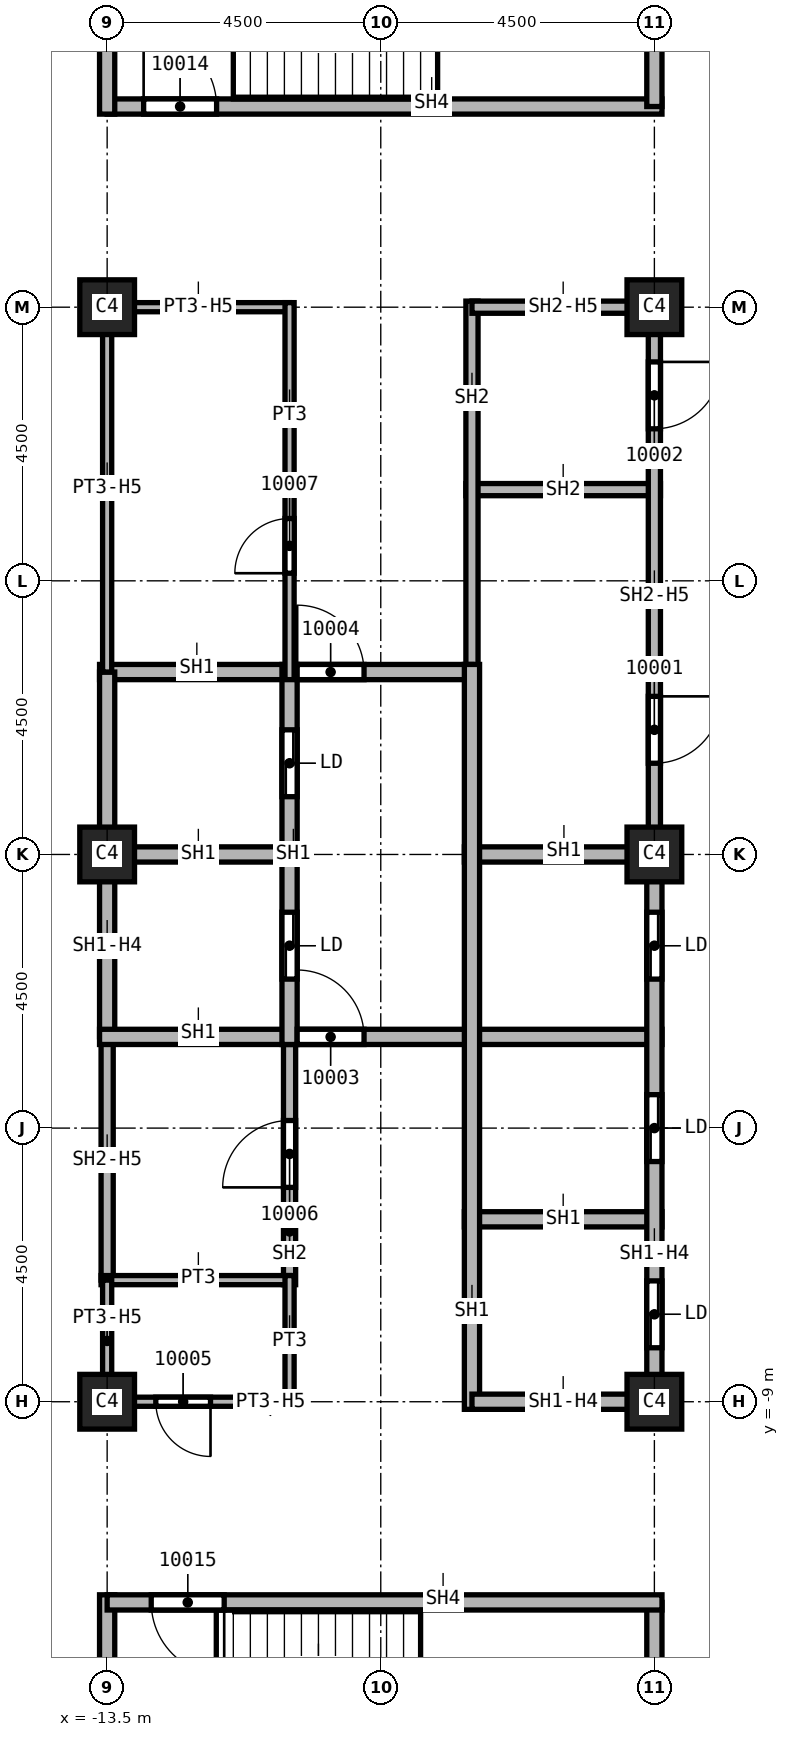
"""IFC4 building model, lengths in metres.
Left out: names, types, materials, properties, quantities, classifications, styles, units other than length and angle.
Written with IfcOpenShell. Run it as: python <this file> out.ifc"""

import sys

from ifc_helpers import new_model, si_unit, direction, frame, frame_2d, origin, origin_2d, place, context, subcontext, project, spatial, rectangle, extrude, element, fill, save


model = new_model("IFC4")
c1 = context("Model", 3, precision=1e-05, world=origin(), true_north=direction((0.0, 1.0)))
c2 = subcontext(c1, "Body", "Model", "MODEL_VIEW")
j1 = project(units=[si_unit("LENGTHUNIT", "METRE"), si_unit("PLANEANGLEUNIT", "RADIAN")], contexts=[c1])
p1 = place(None, origin())
s1 = spatial("IfcSite", under=j1, at=p1, CompositionType="ELEMENT")
p2 = place(p1, origin())
s2 = spatial("IfcBuilding", under=s1, at=p2, CompositionType="ELEMENT")
p3 = place(p2, frame((0.0, 0.0, 170.0)))
s3 = spatial("IfcBuildingStorey", under=s2, at=p3, CompositionType="ELEMENT", Elevation=170.0)
for number, where, z_axis, x_axis in (
    (1, (-4.5, 0.0, 0.0), (0.0, 0.0, 1.0), (1.0, 0.0, 0.0)),
    (2, (-4.5, 9.0, 0.0), (0.0, 0.0, 1.0), (1.0, 0.0, 0.0)),
    (3, (-4.5, -9.0, 0.0), (0.0, 0.0, 1.0), (1.0, 0.0, 0.0)),
    (4, (-13.5, 0.0, 0.0), (0.0, 0.0, 1.0), (1.0, 0.0, 0.0)),
    (5, (-13.5, 9.0, 0.0), (0.0, 0.0, 1.0), (1.0, 0.0, 0.0)),
    (6, (-13.5, -9.0, 0.0), (0.0, 0.0, 1.0), (1.0, 0.0, 0.0)),
):
    element("IfcColumn", number, at=place(p3, frame(where, z_axis=z_axis, x_axis=x_axis)), inside=s3, PredefinedType="COLUMN", context=c2, shape_type="SweptSolid", body=[
        extrude(rectangle(XDim=0.9, YDim=0.9, at=origin_2d()), origin(), (0.0, 0.0, 1.0), 3.7),
    ])
p4 = place(p3, frame((-13.5, -7.0, 0.0), z_axis=(0.0, 0.0, 1.0), x_axis=(0.0, 1.0, 0.0)))
e7 = element("IfcWall", 7, at=p4, inside=s3, PredefinedType="SOLIDWALL", context=c2, shape_type="SweptSolid", body=[
    extrude(rectangle(XDim=4.0, YDim=0.2, at=frame_2d((2.0, 0.0))), origin(), (0.0, 0.0, 1.0), 2.938),
])
p5 = place(p3, frame((-10.5, -7.075, 0.0), z_axis=(0.0, 0.0, 1.0), x_axis=(0.0, 1.0, 0.0)))
e8 = element("IfcWall", 8, at=p5, inside=s3, PredefinedType="SOLIDWALL", context=c2, shape_type="SweptSolid", body=[
    extrude(rectangle(XDim=4.2, YDim=0.2, at=frame_2d((2.1, 0.0))), origin(), (0.0, 0.0, 1.0), 3.7),
])
p6 = place(p5, frame((1.6, 0.0, 0.0)))
e9 = element("IfcOpeningElement", 9, at=p6, cuts=e8, PredefinedType="OPENING", context=c2, shape_type="SweptSolid", body=[
    extrude(rectangle(XDim=1.1, YDim=2.1, at=frame_2d((0.55, 1.05))), frame((0.0, 0.1, 0.0), z_axis=(0.0, -1.0, 0.0), x_axis=(1.0, 0.0, 0.0)), (0.0, 0.0, 1.0), 0.2),
])
p7 = place(p3, frame((-7.6, 6.0, 0.0), z_axis=(0.0, 0.0, 1.0), x_axis=(1.0, 0.0, 0.0)))
e10 = element("IfcWall", 10, at=p7, inside=s3, PredefinedType="SOLIDWALL", context=c2, shape_type="SweptSolid", body=[
    extrude(rectangle(XDim=3.2, YDim=0.2, at=frame_2d((1.6, 0.0))), origin(), (0.0, 0.0, 1.0), 3.7),
])
p8 = place(p3, frame((-7.5, 2.875, 0.0), z_axis=(0.0, 0.0, 1.0), x_axis=(0.0, 1.0, 0.0)))
e11 = element("IfcWall", 11, at=p8, inside=s3, PredefinedType="SOLIDWALL", context=c2, shape_type="SweptSolid", body=[
    extrude(rectangle(XDim=6.225, YDim=0.2, at=frame_2d((3.113, 0.0))), origin(), (0.0, 0.0, 1.0), 3.7),
])
p9 = place(p3, frame((-7.5, 9.0, 0.0), z_axis=(0.0, 0.0, 1.0), x_axis=(1.0, 0.0, 0.0)))
e12 = element("IfcWall", 12, at=p9, inside=s3, PredefinedType="SOLIDWALL", context=c2, shape_type="SweptSolid", body=[
    extrude(rectangle(XDim=3.0, YDim=0.2, at=frame_2d((1.5, 0.0))), origin(), (0.0, 0.0, 1.0), 2.938),
])
p10 = place(p3, frame((-4.5, 9.1, 0.0), z_axis=(0.0, 0.0, 1.0), x_axis=(0.0, -1.0, 0.0)))
e13 = element("IfcWall", 13, at=p10, inside=s3, PredefinedType="SOLIDWALL", context=c2, shape_type="SweptSolid", body=[
    extrude(rectangle(XDim=9.1, YDim=0.2, at=frame_2d((4.55, 0.0))), origin(), (0.0, 0.0, 1.0), 2.938),
])
p11 = place(p10, frame((6.5, 0.0, 0.0)))
e14 = element("IfcOpeningElement", 14, at=p11, cuts=e13, PredefinedType="OPENING", context=c2, shape_type="SweptSolid", body=[
    extrude(rectangle(XDim=1.1, YDim=2.1, at=frame_2d((0.55, 1.05))), frame((0.0, 0.1, 0.0), z_axis=(0.0, -1.0, 0.0), x_axis=(1.0, 0.0, 0.0)), (0.0, 0.0, 1.0), 0.2),
])
p12 = place(p10, frame((1.0, 0.0, 0.0)))
e15 = element("IfcOpeningElement", 15, at=p12, cuts=e13, PredefinedType="OPENING", context=c2, shape_type="SweptSolid", body=[
    extrude(rectangle(XDim=1.1, YDim=2.1, at=frame_2d((0.55, 1.05))), frame((0.0, 0.1, 0.0), z_axis=(0.0, -1.0, 0.0), x_axis=(1.0, 0.0, 0.0)), (0.0, 0.0, 1.0), 0.2),
])
p13 = place(p3, frame((-13.625, 0.0, 0.0), z_axis=(0.0, 0.0, 1.0), x_axis=(1.0, 0.0, 0.0)))
e16 = element("IfcWall", 16, at=p13, inside=s3, PredefinedType="SOLIDWALL", context=c2, shape_type="SweptSolid", body=[
    extrude(rectangle(XDim=3.125, YDim=0.25, at=frame_2d((1.562, 0.0))), origin(), (0.0, 0.0, 1.0), 3.7),
])
p14 = place(p3, frame((-13.625, 3.0, 0.0), z_axis=(0.0, 0.0, 1.0), x_axis=(1.0, 0.0, 0.0)))
e17 = element("IfcWall", 17, at=p14, inside=s3, PredefinedType="SOLIDWALL", context=c2, shape_type="SweptSolid", body=[
    extrude(rectangle(XDim=6.125, YDim=0.25, at=frame_2d((3.062, 0.0))), origin(), (0.0, 0.0, 1.0), 3.7),
])
p15 = place(p14, frame((3.25, 0.0, 0.0)))
e18 = element("IfcOpeningElement", 18, at=p15, cuts=e17, PredefinedType="OPENING", context=c2, shape_type="SweptSolid", body=[
    extrude(rectangle(XDim=1.1, YDim=2.1, at=frame_2d((0.55, 1.05))), frame((0.0, 0.125, 0.0), z_axis=(0.0, -1.0, 0.0), x_axis=(1.0, 0.0, 0.0)), (0.0, 0.0, 1.0), 0.25),
])
p16 = place(p3, frame((-13.5, -3.0, 0.0), z_axis=(0.0, 0.0, 1.0), x_axis=(0.0, 1.0, 0.0)))
e19 = element("IfcWall", 19, at=p16, inside=s3, PredefinedType="SOLIDWALL", context=c2, shape_type="SweptSolid", body=[
    extrude(rectangle(XDim=6.0, YDim=0.25, at=frame_2d((3.0, 0.0))), origin(), (0.0, 0.0, 1.0), 2.938),
])
p17 = place(p3, frame((-13.625, -3.0, 0.0), z_axis=(0.0, 0.0, 1.0), x_axis=(1.0, 0.0, 0.0)))
e20 = element("IfcWall", 20, at=p17, inside=s3, PredefinedType="SOLIDWALL", context=c2, shape_type="SweptSolid", body=[
    extrude(rectangle(XDim=9.25, YDim=0.25, at=frame_2d((4.625, 0.0))), origin(), (0.0, 0.0, 1.0), 3.7),
])
p18 = place(p17, frame((3.25, 0.0, 0.0)))
e21 = element("IfcOpeningElement", 21, at=p18, cuts=e20, PredefinedType="OPENING", context=c2, shape_type="SweptSolid", body=[
    extrude(rectangle(XDim=1.1, YDim=2.1, at=frame_2d((0.55, 1.05))), frame((0.0, 0.125, 0.0), z_axis=(0.0, -1.0, 0.0), x_axis=(1.0, 0.0, 0.0)), (0.0, 0.0, 1.0), 0.25),
])
p19 = place(p3, frame((-10.5, -3.125, 0.0), z_axis=(0.0, 0.0, 1.0), x_axis=(0.0, 1.0, 0.0)))
e22 = element("IfcWall", 22, at=p19, inside=s3, PredefinedType="SOLIDWALL", context=c2, shape_type="SweptSolid", body=[
    extrude(rectangle(XDim=6.25, YDim=0.25, at=frame_2d((3.125, 0.0))), origin(), (0.0, 0.0, 1.0), 3.7),
])
p20 = place(p19, frame((1.075, 0.0, 0.0)))
e23 = element("IfcOpeningElement", 23, at=p20, cuts=e22, PredefinedType="OPENING", context=c2, shape_type="SweptSolid", body=[
    extrude(rectangle(XDim=1.1, YDim=2.1, at=frame_2d((0.55, 1.05))), frame((0.0, 0.125, 0.0), z_axis=(0.0, -1.0, 0.0), x_axis=(1.0, 0.0, 0.0)), (0.0, 0.0, 1.0), 0.25),
])
p21 = place(p19, frame((4.075, 0.0, 0.0)))
e24 = element("IfcOpeningElement", 24, at=p21, cuts=e22, PredefinedType="OPENING", context=c2, shape_type="SweptSolid", body=[
    extrude(rectangle(XDim=1.1, YDim=2.1, at=frame_2d((0.55, 1.05))), frame((0.0, 0.125, 0.0), z_axis=(0.0, -1.0, 0.0), x_axis=(1.0, 0.0, 0.0)), (0.0, 0.0, 1.0), 0.25),
])
for number, where, z_axis, x_axis in (
    (25, (-7.625, -6.0, 0.0), (0.0, 0.0, 1.0), (1.0, 0.0, 0.0)),
    (26, (-7.625, 0.0, 0.0), (0.0, 0.0, 1.0), (1.0, 0.0, 0.0)),
):
    element("IfcWall", number, at=place(p3, frame(where, z_axis=z_axis, x_axis=x_axis)), inside=s3, PredefinedType="SOLIDWALL", context=c2, shape_type="SweptSolid", body=[
        extrude(rectangle(XDim=3.25, YDim=0.25, at=frame_2d((1.625, 0.0))), origin(), (0.0, 0.0, 1.0), 3.7),
    ])
p22 = place(p3, frame((-7.5, -9.125, 0.0), z_axis=(0.0, 0.0, 1.0), x_axis=(0.0, 1.0, 0.0)))
e27 = element("IfcWall", 27, at=p22, inside=s3, PredefinedType="SOLIDWALL", context=c2, shape_type="SweptSolid", body=[
    extrude(rectangle(XDim=12.25, YDim=0.25, at=frame_2d((6.125, 0.0))), origin(), (0.0, 0.0, 1.0), 3.7),
])
p23 = place(p3, frame((-4.5, -9.0, 0.0), z_axis=(0.0, 0.0, 1.0), x_axis=(-1.0, 0.0, 0.0)))
e28 = element("IfcWall", 28, at=p23, inside=s3, PredefinedType="SOLIDWALL", context=c2, shape_type="SweptSolid", body=[
    extrude(rectangle(XDim=3.0, YDim=0.25, at=frame_2d((1.5, 0.0))), origin(), (0.0, 0.0, 1.0), 2.938),
])
p24 = place(p3, frame((-4.5, 0.0, 0.0), z_axis=(0.0, 0.0, 1.0), x_axis=(0.0, -1.0, 0.0)))
e29 = element("IfcWall", 29, at=p24, inside=s3, PredefinedType="SOLIDWALL", context=c2, shape_type="SweptSolid", body=[
    extrude(rectangle(XDim=9.125, YDim=0.25, at=frame_2d((4.562, 0.0))), origin(), (0.0, 0.0, 1.0), 2.938),
])
p25 = place(p24, frame((7.012, 0.0, 0.0)))
e30 = element("IfcOpeningElement", 30, at=p25, cuts=e29, PredefinedType="OPENING", context=c2, shape_type="SweptSolid", body=[
    extrude(rectangle(XDim=1.1, YDim=2.1, at=frame_2d((0.55, 1.05))), frame((0.0, 0.125, 0.0), z_axis=(0.0, -1.0, 0.0), x_axis=(1.0, 0.0, 0.0)), (0.0, 0.0, 1.0), 0.25),
])
p26 = place(p24, frame((3.95, 0.0, 0.0)))
e31 = element("IfcOpeningElement", 31, at=p26, cuts=e29, PredefinedType="OPENING", context=c2, shape_type="SweptSolid", body=[
    extrude(rectangle(XDim=1.1, YDim=2.1, at=frame_2d((0.55, 1.05))), frame((0.0, 0.125, 0.0), z_axis=(0.0, -1.0, 0.0), x_axis=(1.0, 0.0, 0.0)), (0.0, 0.0, 1.0), 0.25),
])
p27 = place(p24, frame((0.95, 0.0, 0.0)))
e32 = element("IfcOpeningElement", 32, at=p27, cuts=e29, PredefinedType="OPENING", context=c2, shape_type="SweptSolid", body=[
    extrude(rectangle(XDim=1.1, YDim=2.1, at=frame_2d((0.55, 1.05))), frame((0.0, 0.125, 0.0), z_axis=(0.0, -1.0, 0.0), x_axis=(1.0, 0.0, 0.0)), (0.0, 0.0, 1.0), 0.25),
])
p28 = place(p3, frame((-13.5, -12.175, 0.0), z_axis=(0.0, 0.0, 1.0), x_axis=(0.0, -1.0, 0.0)))
e33 = element("IfcWall", 33, at=p28, inside=s3, PredefinedType="SOLIDWALL", context=c2, shape_type="SweptSolid", body=[
    extrude(rectangle(XDim=4.75, YDim=0.25, at=frame_2d((2.375, 0.0))), origin(), (0.0, 0.0, 1.0), 3.7),
])
p29 = place(p3, frame((-13.5, 12.3, 0.0), z_axis=(0.0, 0.0, 1.0), x_axis=(1.0, 0.0, 0.0)))
e34 = element("IfcWall", 34, at=p29, inside=s3, PredefinedType="SOLIDWALL", context=c2, shape_type="SweptSolid", body=[
    extrude(rectangle(XDim=9.125, YDim=0.25, at=frame_2d((4.562, 0.0))), origin(), (0.0, 0.0, 1.0), 3.7),
])
p30 = place(p29, frame((0.6, 0.0, 0.0)))
e35 = element("IfcOpeningElement", 35, at=p30, cuts=e34, PredefinedType="OPENING", context=c2, shape_type="SweptSolid", body=[
    extrude(rectangle(XDim=1.2, YDim=2.1, at=frame_2d((0.6, 1.05))), frame((0.0, 0.125, 0.0), z_axis=(0.0, -1.0, 0.0), x_axis=(1.0, 0.0, 0.0)), (0.0, 0.0, 1.0), 0.25),
])
p31 = place(p3, frame((-13.5, 12.175, 0.0), z_axis=(0.0, 0.0, 1.0), x_axis=(0.0, 1.0, 0.0)))
e36 = element("IfcWall", 36, at=p31, inside=s3, PredefinedType="SOLIDWALL", context=c2, shape_type="SweptSolid", body=[
    extrude(rectangle(XDim=4.75, YDim=0.25, at=frame_2d((2.375, 0.0))), origin(), (0.0, 0.0, 1.0), 3.7),
])
p32 = place(p3, frame((-4.5, -12.3, 0.0), z_axis=(0.0, 0.0, 1.0), x_axis=(0.0, -1.0, 0.0)))
e37 = element("IfcWall", 37, at=p32, inside=s3, PredefinedType="SOLIDWALL", context=c2, shape_type="SweptSolid", body=[
    extrude(rectangle(XDim=4.625, YDim=0.25, at=frame_2d((2.312, 0.0))), origin(), (0.0, 0.0, 1.0), 3.7),
])
p33 = place(p3, frame((-4.5, 16.8, 0.0), z_axis=(0.0, 0.0, 1.0), x_axis=(0.0, -1.0, 0.0)))
e38 = element("IfcWall", 38, at=p33, inside=s3, PredefinedType="SOLIDWALL", context=c2, shape_type="SweptSolid", body=[
    extrude(rectangle(XDim=4.5, YDim=0.25, at=frame_2d((2.25, 0.0))), origin(), (0.0, 0.0, 1.0), 3.7),
])
p34 = place(p3, frame((-4.375, -12.3, 0.0), z_axis=(0.0, 0.0, 1.0), x_axis=(-1.0, 0.0, 0.0)))
e39 = element("IfcWall", 39, at=p34, inside=s3, PredefinedType="SOLIDWALL", context=c2, shape_type="SweptSolid", body=[
    extrude(rectangle(XDim=9.125, YDim=0.25, at=frame_2d((4.562, 0.0))), origin(), (0.0, 0.0, 1.0), 3.7),
])
p35 = place(p34, frame((7.2, 0.0, 0.0)))
e40 = element("IfcOpeningElement", 40, at=p35, cuts=e39, PredefinedType="OPENING", context=c2, shape_type="SweptSolid", body=[
    extrude(rectangle(XDim=1.2, YDim=2.1, at=frame_2d((0.6, 1.05))), frame((0.0, 0.125, 0.0), z_axis=(0.0, -1.0, 0.0), x_axis=(1.0, 0.0, 0.0)), (0.0, 0.0, 1.0), 0.25),
])
p36 = place(p3, frame((-13.6, -7.0, 0.0), z_axis=(0.0, 0.0, 1.0), x_axis=(1.0, 0.0, 0.0)))
e41 = element("IfcWall", 41, at=p36, inside=s3, PredefinedType="PARTITIONING", context=c2, shape_type="SweptSolid", body=[
    extrude(rectangle(XDim=3.1, YDim=0.15, at=frame_2d((1.55, 0.0))), origin(), (0.0, 0.0, 1.0), 3.7),
])
p37 = place(p3, frame((-13.5, -9.075, 0.0), z_axis=(0.0, 0.0, 1.0), x_axis=(0.0, 1.0, 0.0)))
e42 = element("IfcWall", 42, at=p37, inside=s3, PredefinedType="PARTITIONING", context=c2, shape_type="SweptSolid", body=[
    extrude(rectangle(XDim=2.075, YDim=0.15, at=frame_2d((1.038, 0.0))), origin(), (0.0, 0.0, 1.0), 2.938),
])
p38 = place(p3, frame((-13.5, 3.0, 0.0), z_axis=(0.0, 0.0, 1.0), x_axis=(0.0, 1.0, 0.0)))
e43 = element("IfcWall", 43, at=p38, inside=s3, PredefinedType="PARTITIONING", context=c2, shape_type="SweptSolid", body=[
    extrude(rectangle(XDim=6.075, YDim=0.15, at=frame_2d((3.038, 0.0))), origin(), (0.0, 0.0, 1.0), 2.938),
])
p39 = place(p3, frame((-13.5, 9.0, 0.0), z_axis=(0.0, 0.0, 1.0), x_axis=(1.0, 0.0, 0.0)))
e44 = element("IfcWall", 44, at=p39, inside=s3, PredefinedType="PARTITIONING", context=c2, shape_type="SweptSolid", body=[
    extrude(rectangle(XDim=3.0, YDim=0.15, at=frame_2d((1.5, 0.0))), origin(), (0.0, 0.0, 1.0), 2.938),
])
p40 = place(p3, frame((-10.5, -9.075, 0.0), z_axis=(0.0, 0.0, 1.0), x_axis=(0.0, 1.0, 0.0)))
e45 = element("IfcWall", 45, at=p40, inside=s3, PredefinedType="PARTITIONING", context=c2, shape_type="SweptSolid", body=[
    extrude(rectangle(XDim=2.15, YDim=0.15, at=frame_2d((1.075, 0.0))), origin(), (0.0, 0.0, 1.0), 3.7),
])
p41 = place(p3, frame((-10.5, -9.0, 0.0), z_axis=(0.0, 0.0, 1.0), x_axis=(-1.0, 0.0, 0.0)))
e46 = element("IfcWall", 46, at=p41, inside=s3, PredefinedType="PARTITIONING", context=c2, shape_type="SweptSolid", body=[
    extrude(rectangle(XDim=3.0, YDim=0.15, at=frame_2d((1.5, 0.0))), origin(), (0.0, 0.0, 1.0), 2.938),
])
p42 = place(p41, frame((1.3, 0.0, 0.0)))
e47 = element("IfcOpeningElement", 47, at=p42, cuts=e46, PredefinedType="OPENING", context=c2, shape_type="SweptSolid", body=[
    extrude(rectangle(XDim=0.9, YDim=2.1, at=frame_2d((0.45, 1.05))), frame((0.0, 0.075, 0.0), z_axis=(0.0, -1.0, 0.0), x_axis=(1.0, 0.0, 0.0)), (0.0, 0.0, 1.0), 0.15),
])
p43 = place(p3, frame((-10.5, 2.875, 0.0), z_axis=(0.0, 0.0, 1.0), x_axis=(0.0, 1.0, 0.0)))
e48 = element("IfcWall", 48, at=p43, inside=s3, PredefinedType="PARTITIONING", context=c2, shape_type="SweptSolid", body=[
    extrude(rectangle(XDim=6.2, YDim=0.15, at=frame_2d((3.1, 0.0))), origin(), (0.0, 0.0, 1.0), 3.7),
])
p44 = place(p43, frame((1.75, 0.0, 0.0)))
e49 = element("IfcOpeningElement", 49, at=p44, cuts=e48, PredefinedType="OPENING", context=c2, shape_type="SweptSolid", body=[
    extrude(rectangle(XDim=0.9, YDim=2.1, at=frame_2d((0.45, 1.05))), frame((0.0, 0.075, 0.0), z_axis=(0.0, -1.0, 0.0), x_axis=(1.0, 0.0, 0.0)), (0.0, 0.0, 1.0), 0.15),
])
p45 = place(p11, origin())
e50 = element("IfcDoor", 50, at=p45, inside=s3, OperationType="SINGLE_SWING_RIGHT", PredefinedType="DOOR", context=c2, shape_type="SweptSolid", body=[
    extrude(rectangle(XDim=1.1, YDim=2.1, at=frame_2d((0.55, 1.05))), frame((0.0, 0.025, 0.0), z_axis=(0.0, -1.0, 0.0), x_axis=(1.0, 0.0, 0.0)), (0.0, 0.0, 1.0), 0.05),
])
fill(e14, e50)
p46 = place(p12, origin())
e51 = element("IfcDoor", 51, at=p46, inside=s3, OperationType="SINGLE_SWING_LEFT", PredefinedType="DOOR", context=c2, shape_type="SweptSolid", body=[
    extrude(rectangle(XDim=1.1, YDim=2.1, at=frame_2d((0.55, 1.05))), frame((0.0, 0.025, 0.0), z_axis=(0.0, -1.0, 0.0), x_axis=(1.0, 0.0, 0.0)), (0.0, 0.0, 1.0), 0.05),
])
fill(e15, e51)
p47 = place(p18, origin())
e52 = element("IfcDoor", 52, at=p47, inside=s3, OperationType="SINGLE_SWING_RIGHT", PredefinedType="DOOR", context=c2, shape_type="SweptSolid", body=[
    extrude(rectangle(XDim=1.1, YDim=2.1, at=frame_2d((0.55, 1.05))), frame((0.0, 0.025, 0.0), z_axis=(0.0, -1.0, 0.0), x_axis=(1.0, 0.0, 0.0)), (0.0, 0.0, 1.0), 0.05),
])
fill(e21, e52)
p48 = place(p15, origin())
e53 = element("IfcDoor", 53, at=p48, inside=s3, OperationType="SINGLE_SWING_LEFT", PredefinedType="DOOR", context=c2, shape_type="SweptSolid", body=[
    extrude(rectangle(XDim=1.1, YDim=2.1, at=frame_2d((0.55, 1.05))), frame((0.0, 0.025, 0.0), z_axis=(0.0, -1.0, 0.0), x_axis=(1.0, 0.0, 0.0)), (0.0, 0.0, 1.0), 0.05),
])
fill(e18, e53)
p49 = place(p42, origin())
e54 = element("IfcDoor", 54, at=p49, inside=s3, OperationType="SINGLE_SWING_RIGHT", PredefinedType="DOOR", context=c2, shape_type="SweptSolid", body=[
    extrude(rectangle(XDim=0.9, YDim=2.1, at=frame_2d((0.45, 1.05))), frame((0.0, 0.025, 0.0), z_axis=(0.0, -1.0, 0.0), x_axis=(1.0, 0.0, 0.0)), (0.0, 0.0, 1.0), 0.05),
])
fill(e47, e54)
p50 = place(p6, origin())
e55 = element("IfcDoor", 55, at=p50, inside=s3, OperationType="SINGLE_SWING_LEFT", PredefinedType="DOOR", context=c2, shape_type="SweptSolid", body=[
    extrude(rectangle(XDim=1.1, YDim=2.1, at=frame_2d((0.55, 1.05))), frame((0.0, 0.025, 0.0), z_axis=(0.0, -1.0, 0.0), x_axis=(1.0, 0.0, 0.0)), (0.0, 0.0, 1.0), 0.05),
])
fill(e9, e55)
p51 = place(p44, origin())
e56 = element("IfcDoor", 56, at=p51, inside=s3, OperationType="SINGLE_SWING_RIGHT", PredefinedType="DOOR", context=c2, shape_type="SweptSolid", body=[
    extrude(rectangle(XDim=0.9, YDim=2.1, at=frame_2d((0.45, 1.05))), frame((0.0, 0.025, 0.0), z_axis=(0.0, -1.0, 0.0), x_axis=(1.0, 0.0, 0.0)), (0.0, 0.0, 1.0), 0.05),
])
fill(e49, e56)
p52 = place(p30, origin())
e57 = element("IfcDoor", 57, at=p52, inside=s3, OperationType="SINGLE_SWING_LEFT", PredefinedType="DOOR", context=c2, shape_type="SweptSolid", body=[
    extrude(rectangle(XDim=1.2, YDim=2.1, at=frame_2d((0.6, 1.05))), frame((0.0, 0.025, 0.0), z_axis=(0.0, -1.0, 0.0), x_axis=(1.0, 0.0, 0.0)), (0.0, 0.0, 1.0), 0.05),
])
fill(e35, e57)
p53 = place(p35, origin())
e58 = element("IfcDoor", 58, at=p53, inside=s3, OperationType="SINGLE_SWING_RIGHT", PredefinedType="DOOR", context=c2, shape_type="SweptSolid", body=[
    extrude(rectangle(XDim=1.2, YDim=2.1, at=frame_2d((0.6, 1.05))), frame((0.0, 0.025, 0.0), z_axis=(0.0, -1.0, 0.0), x_axis=(1.0, 0.0, 0.0)), (0.0, 0.0, 1.0), 0.05),
])
fill(e40, e58)
p54 = place(p25, origin())
e59 = element("IfcDoor", 59, at=p54, inside=s3, OperationType="SLIDING_TO_LEFT", PredefinedType="DOOR", context=c2, shape_type="SweptSolid", body=[
    extrude(rectangle(XDim=1.1, YDim=2.1, at=frame_2d((0.55, 1.05))), frame((0.0, 0.025, 0.0), z_axis=(0.0, -1.0, 0.0), x_axis=(1.0, 0.0, 0.0)), (0.0, 0.0, 1.0), 0.05),
])
fill(e30, e59)
p55 = place(p26, origin())
e60 = element("IfcDoor", 60, at=p55, inside=s3, OperationType="SLIDING_TO_LEFT", PredefinedType="DOOR", context=c2, shape_type="SweptSolid", body=[
    extrude(rectangle(XDim=1.1, YDim=2.1, at=frame_2d((0.55, 1.05))), frame((0.0, 0.025, 0.0), z_axis=(0.0, -1.0, 0.0), x_axis=(1.0, 0.0, 0.0)), (0.0, 0.0, 1.0), 0.05),
])
fill(e31, e60)
p56 = place(p27, origin())
e61 = element("IfcDoor", 61, at=p56, inside=s3, OperationType="SLIDING_TO_LEFT", PredefinedType="DOOR", context=c2, shape_type="SweptSolid", body=[
    extrude(rectangle(XDim=1.1, YDim=2.1, at=frame_2d((0.55, 1.05))), frame((0.0, 0.025, 0.0), z_axis=(0.0, -1.0, 0.0), x_axis=(1.0, 0.0, 0.0)), (0.0, 0.0, 1.0), 0.05),
])
fill(e32, e61)
p57 = place(p20, origin())
e62 = element("IfcDoor", 62, at=p57, inside=s3, OperationType="SLIDING_TO_LEFT", PredefinedType="DOOR", context=c2, shape_type="SweptSolid", body=[
    extrude(rectangle(XDim=1.1, YDim=2.1, at=frame_2d((0.55, 1.05))), frame((0.0, 0.025, 0.0), z_axis=(0.0, -1.0, 0.0), x_axis=(1.0, 0.0, 0.0)), (0.0, 0.0, 1.0), 0.05),
])
fill(e23, e62)
p58 = place(p21, origin())
e63 = element("IfcDoor", 63, at=p58, inside=s3, OperationType="SLIDING_TO_LEFT", PredefinedType="DOOR", context=c2, shape_type="SweptSolid", body=[
    extrude(rectangle(XDim=1.1, YDim=2.1, at=frame_2d((0.55, 1.05))), frame((0.0, 0.025, 0.0), z_axis=(0.0, -1.0, 0.0), x_axis=(1.0, 0.0, 0.0)), (0.0, 0.0, 1.0), 0.05),
])
fill(e24, e63)
save(model, sys.argv[1])
